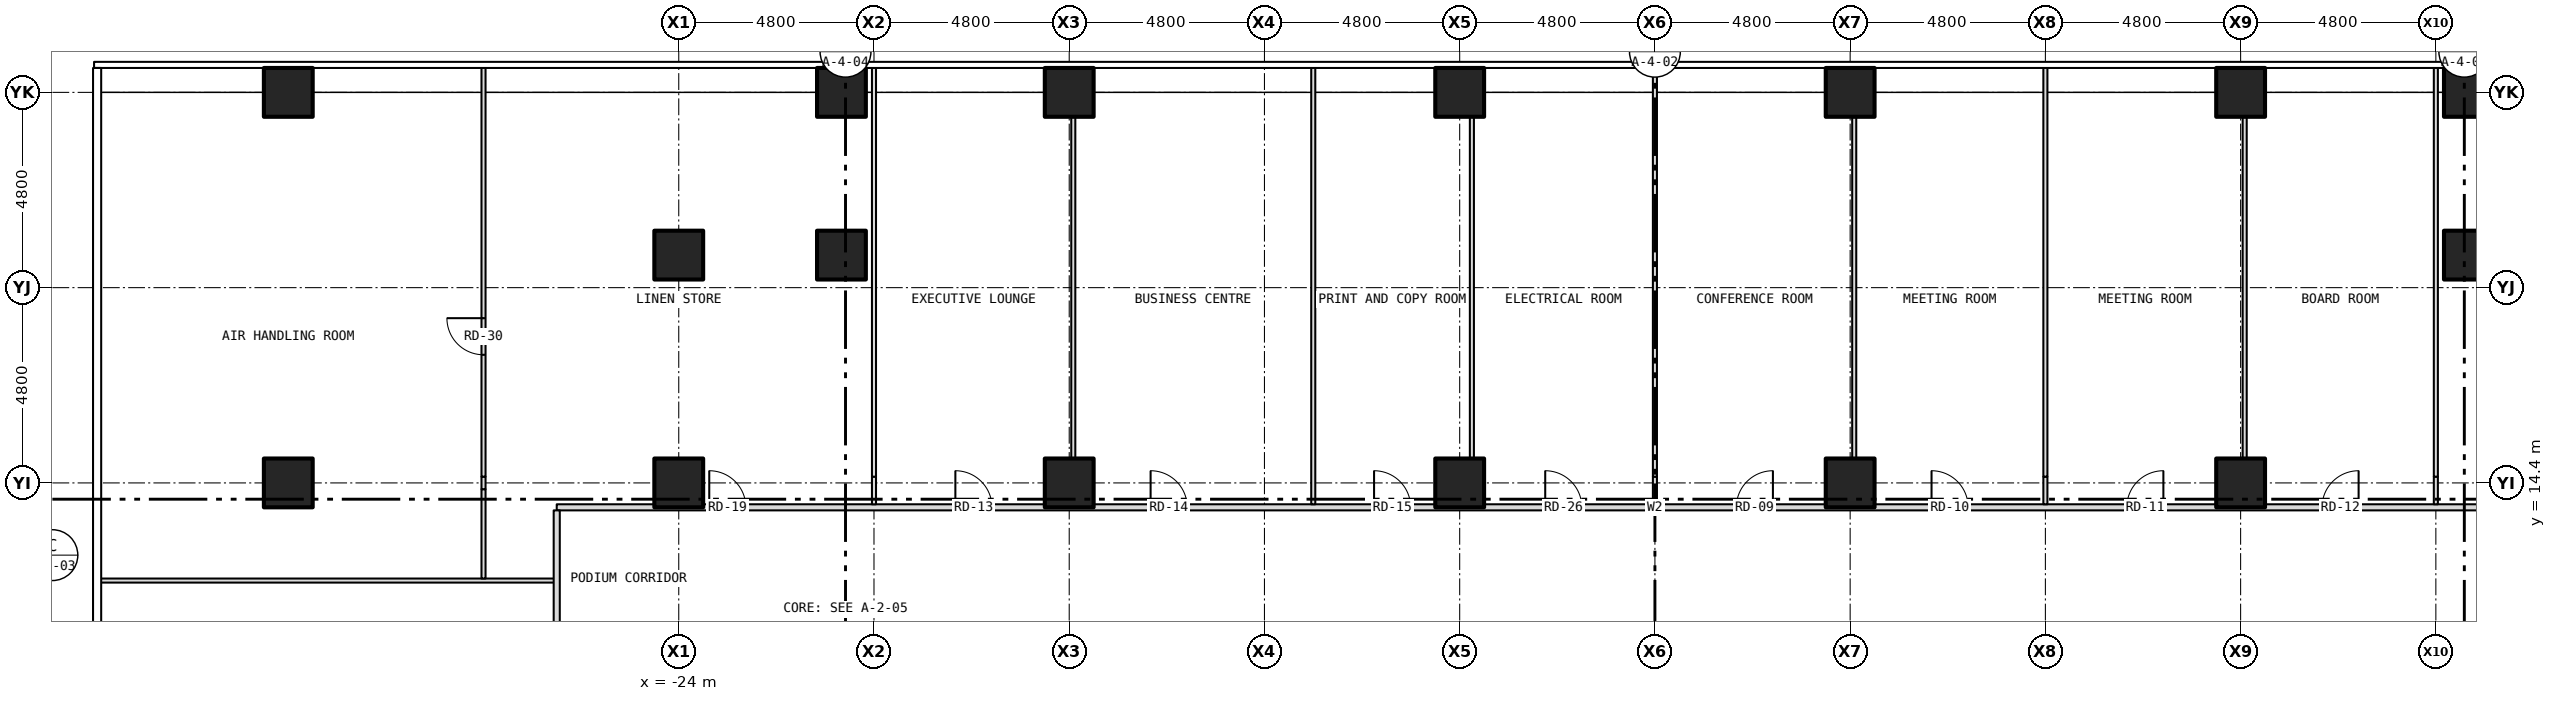
"""IFC4 building model, lengths in metres.
Left out: names, types, materials, properties, quantities, classifications, styles, units other than length and angle.
Written with IfcOpenShell. Run it as: python <this file> out.ifc"""

import sys

from ifc_helpers import new_model, si_unit, direction, frame, frame_2d, origin, origin_2d, place, context, subcontext, project, spatial, rectangle, hollow_rectangle, extrude, element, fill, save


model = new_model("IFC4")
c1 = context("Model", 3, precision=1e-05, world=origin(), true_north=direction((0.0, 1.0)))
c2 = subcontext(c1, "Body", "Model", "MODEL_VIEW")
j1 = project(units=[si_unit("LENGTHUNIT", "METRE"), si_unit("PLANEANGLEUNIT", "RADIAN")], contexts=[c1])
p1 = place(None, origin())
s1 = spatial("IfcSite", under=j1, at=p1, CompositionType="ELEMENT")
p2 = place(p1, origin())
s2 = spatial("IfcBuilding", under=s1, at=p2, CompositionType="ELEMENT")
p3 = place(p2, frame((0.0, 0.0, 15.5)))
s3 = spatial("IfcBuildingStorey", under=s2, at=p3, CompositionType="ELEMENT", Elevation=15.5)
for number, where, z_axis, x_axis in (
    (1, (-33.6, 14.4, -0.2), (0.0, 0.0, 1.0), (1.0, 0.0, 0.0)),
    (2, (-33.6, 24.0, -0.2), (0.0, 0.0, 1.0), (1.0, 0.0, 0.0)),
    (3, (-20.0, 24.0, -0.2), (0.0, 0.0, 1.0), (1.0, 0.0, 0.0)),
    (4, (-14.4, 24.0, -0.2), (0.0, 0.0, 1.0), (1.0, 0.0, 0.0)),
    (5, (-4.8, 24.0, -0.2), (0.0, 0.0, 1.0), (1.0, 0.0, 0.0)),
    (6, (4.8, 24.0, -0.2), (0.0, 0.0, 1.0), (1.0, 0.0, 0.0)),
    (7, (14.4, 24.0, -0.2), (0.0, 0.0, 1.0), (1.0, 0.0, 0.0)),
    (8, (20.0, 24.0, -0.2), (0.0, 0.0, 1.0), (1.0, 0.0, 0.0)),
    (9, (-24.0, 14.4, -0.2), (0.0, 0.0, 1.0), (1.0, 0.0, 0.0)),
    (10, (-24.0, 20.0, -0.2), (0.0, 0.0, 1.0), (1.0, 0.0, 0.0)),
    (11, (-20.0, 20.0, -0.2), (0.0, 0.0, 1.0), (1.0, 0.0, 0.0)),
    (12, (-14.4, 14.4, -0.2), (0.0, 0.0, 1.0), (1.0, 0.0, 0.0)),
    (13, (-4.8, 14.4, -0.2), (0.0, 0.0, 1.0), (1.0, 0.0, 0.0)),
    (14, (4.8, 14.4, -0.2), (0.0, 0.0, 1.0), (1.0, 0.0, 0.0)),
    (15, (14.4, 14.4, -0.2), (0.0, 0.0, 1.0), (1.0, 0.0, 0.0)),
    (16, (20.0, 20.0, -0.2), (0.0, 0.0, 1.0), (1.0, 0.0, 0.0)),
):
    element("IfcColumn", number, at=place(p3, frame(where, z_axis=z_axis, x_axis=x_axis)), inside=s3, PredefinedType="COLUMN", context=c2, shape_type="SweptSolid", body=[
        extrude(hollow_rectangle(XDim=1.2, YDim=1.2, WallThickness=0.07, at=origin_2d()), origin(), (0.0, 0.0, 1.0), 4.5),
    ])
p4 = place(p3, frame((-38.28, 12.0, 0.0), z_axis=(0.0, 0.0, 1.0), x_axis=(1.0, 0.0, 0.0)))
e17 = element("IfcWall", 17, at=p4, inside=s3, PredefinedType="PARTITIONING", context=c2, shape_type="SweptSolid", body=[
    extrude(rectangle(XDim=11.28, YDim=0.1, at=frame_2d((5.64, 0.0))), origin(), (0.0, 0.0, 1.0), 4.3),
])
p5 = place(p3, frame((-27.0, 13.8, 0.0), z_axis=(0.0, 0.0, 1.0), x_axis=(1.0, 0.0, 0.0)))
e18 = element("IfcWall", 18, at=p5, inside=s3, PredefinedType="PARTITIONING", context=c2, shape_type="SweptSolid", body=[
    extrude(rectangle(XDim=54.0, YDim=0.15, at=frame_2d((27.0, 0.0))), origin(), (0.0, 0.0, 1.0), 4.3),
])
p6 = place(p5, frame((29.001, 0.0, 0.0)))
e19 = element("IfcOpeningElement", 19, at=p6, cuts=e18, PredefinedType="OPENING", context=c2, shape_type="SweptSolid", body=[
    extrude(rectangle(XDim=0.9, YDim=2.1, at=frame_2d((0.45, 1.05))), frame((0.0, 0.087, 0.0), z_axis=(0.0, -1.0, 0.0), x_axis=(1.0, 0.0, 0.0)), (0.0, 0.0, 1.0), 0.174),
])
p7 = place(p5, frame((33.801, 0.0, 0.0)))
e20 = element("IfcOpeningElement", 20, at=p7, cuts=e18, PredefinedType="OPENING", context=c2, shape_type="SweptSolid", body=[
    extrude(rectangle(XDim=0.9, YDim=2.1, at=frame_2d((0.45, 1.05))), frame((0.0, 0.087, 0.0), z_axis=(0.0, -1.0, 0.0), x_axis=(1.0, 0.0, 0.0)), (0.0, 0.0, 1.0), 0.174),
])
p8 = place(p5, frame((38.601, 0.0, 0.0)))
e21 = element("IfcOpeningElement", 21, at=p8, cuts=e18, PredefinedType="OPENING", context=c2, shape_type="SweptSolid", body=[
    extrude(rectangle(XDim=0.9, YDim=2.1, at=frame_2d((0.45, 1.05))), frame((0.0, 0.087, 0.0), z_axis=(0.0, -1.0, 0.0), x_axis=(1.0, 0.0, 0.0)), (0.0, 0.0, 1.0), 0.174),
])
p9 = place(p5, frame((43.401, 0.0, 0.0)))
e22 = element("IfcOpeningElement", 22, at=p9, cuts=e18, PredefinedType="OPENING", context=c2, shape_type="SweptSolid", body=[
    extrude(rectangle(XDim=0.9, YDim=2.1, at=frame_2d((0.45, 1.05))), frame((0.0, 0.087, 0.0), z_axis=(0.0, -1.0, 0.0), x_axis=(1.0, 0.0, 0.0)), (0.0, 0.0, 1.0), 0.174),
])
p10 = place(p5, frame((9.801, 0.0, 0.0)))
e23 = element("IfcOpeningElement", 23, at=p10, cuts=e18, PredefinedType="OPENING", context=c2, shape_type="SweptSolid", body=[
    extrude(rectangle(XDim=0.9, YDim=2.1, at=frame_2d((0.45, 1.05))), frame((0.0, 0.087, 0.0), z_axis=(0.0, -1.0, 0.0), x_axis=(1.0, 0.0, 0.0)), (0.0, 0.0, 1.0), 0.174),
])
p11 = place(p5, frame((14.601, 0.0, 0.0)))
e24 = element("IfcOpeningElement", 24, at=p11, cuts=e18, PredefinedType="OPENING", context=c2, shape_type="SweptSolid", body=[
    extrude(rectangle(XDim=0.9, YDim=2.1, at=frame_2d((0.45, 1.05))), frame((0.0, 0.087, 0.0), z_axis=(0.0, -1.0, 0.0), x_axis=(1.0, 0.0, 0.0)), (0.0, 0.0, 1.0), 0.174),
])
p12 = place(p5, frame((20.095, 0.0, 0.0)))
e25 = element("IfcOpeningElement", 25, at=p12, cuts=e18, PredefinedType="OPENING", context=c2, shape_type="SweptSolid", body=[
    extrude(rectangle(XDim=0.9, YDim=2.1, at=frame_2d((0.45, 1.05))), frame((0.0, 0.087, 0.0), z_axis=(0.0, -1.0, 0.0), x_axis=(1.0, 0.0, 0.0)), (0.0, 0.0, 1.0), 0.174),
])
p13 = place(p5, frame((3.75, 0.0, 0.0)))
e26 = element("IfcOpeningElement", 26, at=p13, cuts=e18, PredefinedType="OPENING", context=c2, shape_type="SweptSolid", body=[
    extrude(rectangle(XDim=0.9, YDim=2.1, at=frame_2d((0.45, 1.05))), frame((0.0, 0.087, 0.0), z_axis=(0.0, -1.0, 0.0), x_axis=(1.0, 0.0, 0.0)), (0.0, 0.0, 1.0), 0.174),
])
p14 = place(p5, frame((49.35, 0.0, 0.0)))
e27 = element("IfcOpeningElement", 27, at=p14, cuts=e18, PredefinedType="OPENING", context=c2, shape_type="SweptSolid", body=[
    extrude(rectangle(XDim=0.9, YDim=2.1, at=frame_2d((0.45, 1.05))), frame((0.0, 0.087, 0.0), z_axis=(0.0, -1.0, 0.0), x_axis=(1.0, 0.0, 0.0)), (0.0, 0.0, 1.0), 0.174),
])
p15 = place(p5, frame((24.303, 0.0, 0.0)))
e28 = element("IfcOpeningElement", 28, at=p15, cuts=e18, PredefinedType="OPENING", context=c2, shape_type="SweptSolid", body=[
    extrude(rectangle(XDim=0.9, YDim=2.1, at=frame_2d((0.45, 1.05))), frame((0.0, 0.087, 0.0), z_axis=(0.0, -1.0, 0.0), x_axis=(1.0, 0.0, 0.0)), (0.0, 0.0, 1.0), 0.174),
])
p16 = place(p3, frame((-28.8, 12.05, 0.0), z_axis=(0.0, 0.0, 1.0), x_axis=(0.0, 1.0, 0.0)))
e29 = element("IfcWall", 29, at=p16, inside=s3, PredefinedType="PARTITIONING", context=c2, shape_type="SweptSolid", body=[
    extrude(rectangle(XDim=2.196, YDim=0.1, at=frame_2d((1.098, 0.0))), origin(), (0.0, 0.0, 1.0), 3.683),
])
p17 = place(p3, frame((-28.8, 14.246, 0.0), z_axis=(0.0, 0.0, 1.0), x_axis=(0.0, 1.0, 0.0)))
e30 = element("IfcWall", 30, at=p17, inside=s3, PredefinedType="PARTITIONING", context=c2, shape_type="SweptSolid", body=[
    extrude(rectangle(XDim=0.308, YDim=0.1, at=frame_2d((0.154, 0.0))), origin(), (0.0, 0.0, 1.0), 4.3),
])
p18 = place(p3, frame((-28.8, 14.554, 0.0), z_axis=(0.0, 0.0, 1.0), x_axis=(0.0, 1.0, 0.0)))
e31 = element("IfcWall", 31, at=p18, inside=s3, PredefinedType="PARTITIONING", context=c2, shape_type="SweptSolid", body=[
    extrude(rectangle(XDim=10.076, YDim=0.1, at=frame_2d((5.038, 0.0))), origin(), (0.0, 0.0, 1.0), 3.683),
])
p19 = place(p18, frame((2.996, 0.0, 0.0)))
e32 = element("IfcOpeningElement", 32, at=p19, cuts=e31, PredefinedType="OPENING", context=c2, shape_type="SweptSolid", body=[
    extrude(rectangle(XDim=0.9, YDim=2.1, at=frame_2d((0.45, 1.05))), frame((0.0, 0.062, 0.0), z_axis=(0.0, -1.0, 0.0), x_axis=(1.0, 0.0, 0.0)), (0.0, 0.0, 1.0), 0.124),
])
p20 = place(p3, frame((-27.0, -13.725, 0.0), z_axis=(0.0, 0.0, 1.0), x_axis=(0.0, 1.0, 0.0)))
e33 = element("IfcWall", 33, at=p20, inside=s3, PredefinedType="PARTITIONING", context=c2, shape_type="SweptSolid", body=[
    extrude(rectangle(XDim=27.45, YDim=0.15, at=frame_2d((13.725, 0.0))), origin(), (0.0, 0.0, 1.0), 4.3),
])
p21 = place(p20, frame((7.275, 0.0, 0.0)))
e34 = element("IfcOpeningElement", 34, at=p21, cuts=e33, PredefinedType="OPENING", context=c2, shape_type="SweptSolid", body=[
    extrude(rectangle(XDim=0.9, YDim=2.1, at=frame_2d((0.45, 1.05))), frame((0.0, 0.087, 0.0), z_axis=(0.0, -1.0, 0.0), x_axis=(1.0, 0.0, 0.0)), (0.0, 0.0, 1.0), 0.174),
])
p22 = place(p20, frame((19.275, 0.0, 0.0)))
e35 = element("IfcOpeningElement", 35, at=p22, cuts=e33, PredefinedType="OPENING", context=c2, shape_type="SweptSolid", body=[
    extrude(rectangle(XDim=0.9, YDim=2.1, at=frame_2d((0.45, 1.05))), frame((0.0, 0.087, 0.0), z_axis=(0.0, -1.0, 0.0), x_axis=(1.0, 0.0, 0.0)), (0.0, 0.0, 1.0), 0.174),
])
p23 = place(p3, frame((-19.2, 13.875, 0.0), z_axis=(0.0, 0.0, 1.0), x_axis=(0.0, 1.0, 0.0)))
e36 = element("IfcWall", 36, at=p23, inside=s3, PredefinedType="PARTITIONING", context=c2, shape_type="SweptSolid", body=[
    extrude(rectangle(XDim=0.679, YDim=0.1, at=frame_2d((0.339, 0.0))), origin(), (0.0, 0.0, 1.0), 4.3),
])
p24 = place(p3, frame((-19.2, 14.554, 0.0), z_axis=(0.0, 0.0, 1.0), x_axis=(0.0, 1.0, 0.0)))
e37 = element("IfcWall", 37, at=p24, inside=s3, PredefinedType="PARTITIONING", context=c2, shape_type="SweptSolid", body=[
    extrude(rectangle(XDim=10.076, YDim=0.1, at=frame_2d((5.038, 0.0))), origin(), (0.0, 0.0, 1.0), 3.683),
])
p25 = place(p3, frame((-14.3, 13.875, 0.0), z_axis=(0.0, 0.0, 1.0), x_axis=(0.0, 1.0, 0.0)))
e38 = element("IfcWall", 38, at=p25, inside=s3, PredefinedType="PARTITIONING", context=c2, shape_type="SweptSolid", body=[
    extrude(rectangle(XDim=1.125, YDim=0.1, at=frame_2d((0.562, 0.0))), origin(), (0.0, 0.0, 1.0), 4.3),
])
p26 = place(p3, frame((-14.3, 15.0, 0.0), z_axis=(0.0, 0.0, 1.0), x_axis=(0.0, 1.0, 0.0)))
e39 = element("IfcWall", 39, at=p26, inside=s3, PredefinedType="PARTITIONING", context=c2, shape_type="SweptSolid", body=[
    extrude(rectangle(XDim=8.4, YDim=0.1, at=frame_2d((4.2, 0.0))), origin(), (0.0, 0.0, 1.0), 3.373),
])
p27 = place(p3, frame((-14.3, 23.4, 0.0), z_axis=(0.0, 0.0, 1.0), x_axis=(0.0, 1.0, 0.0)))
e40 = element("IfcWall", 40, at=p27, inside=s3, PredefinedType="PARTITIONING", context=c2, shape_type="SweptSolid", body=[
    extrude(rectangle(XDim=0.48, YDim=0.1, at=frame_2d((0.24, 0.0))), origin(), (0.0, 0.0, 1.0), 4.3),
])
p28 = place(p3, frame((-8.4, 13.875, 0.0), z_axis=(0.0, 0.0, 1.0), x_axis=(0.0, 1.0, 0.0)))
e41 = element("IfcWall", 41, at=p28, inside=s3, PredefinedType="PARTITIONING", context=c2, shape_type="SweptSolid", body=[
    extrude(rectangle(XDim=10.755, YDim=0.1, at=frame_2d((5.377, 0.0))), origin(), (0.0, 0.0, 1.0), 4.3),
])
p29 = place(p3, frame((-4.5, 13.875, 0.0), z_axis=(0.0, 0.0, 1.0), x_axis=(0.0, 1.0, 0.0)))
e42 = element("IfcWall", 42, at=p29, inside=s3, PredefinedType="PARTITIONING", context=c2, shape_type="SweptSolid", body=[
    extrude(rectangle(XDim=10.005, YDim=0.1, at=frame_2d((5.002, 0.0))), origin(), (0.0, 0.0, 1.0), 4.3),
])
p30 = place(p3, frame((0.0, 13.875, 0.0), z_axis=(0.0, 0.0, 1.0), x_axis=(0.0, 1.0, 0.0)))
e43 = element("IfcWall", 43, at=p30, inside=s3, PredefinedType="PARTITIONING", context=c2, shape_type="SweptSolid", body=[
    extrude(rectangle(XDim=0.679, YDim=0.1, at=frame_2d((0.339, 0.0))), origin(), (0.0, 0.0, 1.0), 4.3),
])
p31 = place(p3, frame((0.0, 14.554, 0.0), z_axis=(0.0, 0.0, 1.0), x_axis=(0.0, 1.0, 0.0)))
e44 = element("IfcWall", 44, at=p31, inside=s3, PredefinedType="PARTITIONING", context=c2, shape_type="SweptSolid", body=[
    extrude(rectangle(XDim=10.076, YDim=0.1, at=frame_2d((5.038, 0.0))), origin(), (0.0, 0.0, 1.0), 3.683),
])
p32 = place(p3, frame((4.9, 13.875, 0.0), z_axis=(0.0, 0.0, 1.0), x_axis=(0.0, 1.0, 0.0)))
e45 = element("IfcWall", 45, at=p32, inside=s3, PredefinedType="PARTITIONING", context=c2, shape_type="SweptSolid", body=[
    extrude(rectangle(XDim=1.125, YDim=0.1, at=frame_2d((0.562, 0.0))), origin(), (0.0, 0.0, 1.0), 4.3),
])
p33 = place(p3, frame((4.9, 15.0, 0.0), z_axis=(0.0, 0.0, 1.0), x_axis=(0.0, 1.0, 0.0)))
e46 = element("IfcWall", 46, at=p33, inside=s3, PredefinedType="PARTITIONING", context=c2, shape_type="SweptSolid", body=[
    extrude(rectangle(XDim=8.4, YDim=0.1, at=frame_2d((4.2, 0.0))), origin(), (0.0, 0.0, 1.0), 3.373),
])
p34 = place(p3, frame((4.9, 23.4, 0.0), z_axis=(0.0, 0.0, 1.0), x_axis=(0.0, 1.0, 0.0)))
e47 = element("IfcWall", 47, at=p34, inside=s3, PredefinedType="PARTITIONING", context=c2, shape_type="SweptSolid", body=[
    extrude(rectangle(XDim=0.48, YDim=0.1, at=frame_2d((0.24, 0.0))), origin(), (0.0, 0.0, 1.0), 4.3),
])
p35 = place(p3, frame((9.6, 13.875, 0.0), z_axis=(0.0, 0.0, 1.0), x_axis=(0.0, 1.0, 0.0)))
e48 = element("IfcWall", 48, at=p35, inside=s3, PredefinedType="PARTITIONING", context=c2, shape_type="SweptSolid", body=[
    extrude(rectangle(XDim=0.679, YDim=0.1, at=frame_2d((0.339, 0.0))), origin(), (0.0, 0.0, 1.0), 4.3),
])
p36 = place(p3, frame((9.6, 14.554, 0.0), z_axis=(0.0, 0.0, 1.0), x_axis=(0.0, 1.0, 0.0)))
e49 = element("IfcWall", 49, at=p36, inside=s3, PredefinedType="PARTITIONING", context=c2, shape_type="SweptSolid", body=[
    extrude(rectangle(XDim=10.076, YDim=0.1, at=frame_2d((5.038, 0.0))), origin(), (0.0, 0.0, 1.0), 3.683),
])
p37 = place(p3, frame((14.5, 13.875, 0.0), z_axis=(0.0, 0.0, 1.0), x_axis=(0.0, 1.0, 0.0)))
e50 = element("IfcWall", 50, at=p37, inside=s3, PredefinedType="PARTITIONING", context=c2, shape_type="SweptSolid", body=[
    extrude(rectangle(XDim=1.125, YDim=0.1, at=frame_2d((0.562, 0.0))), origin(), (0.0, 0.0, 1.0), 4.3),
])
p38 = place(p3, frame((14.5, 15.0, 0.0), z_axis=(0.0, 0.0, 1.0), x_axis=(0.0, 1.0, 0.0)))
e51 = element("IfcWall", 51, at=p38, inside=s3, PredefinedType="PARTITIONING", context=c2, shape_type="SweptSolid", body=[
    extrude(rectangle(XDim=8.4, YDim=0.1, at=frame_2d((4.2, 0.0))), origin(), (0.0, 0.0, 1.0), 3.373),
])
p39 = place(p3, frame((14.5, 23.4, 0.0), z_axis=(0.0, 0.0, 1.0), x_axis=(0.0, 1.0, 0.0)))
e52 = element("IfcWall", 52, at=p39, inside=s3, PredefinedType="PARTITIONING", context=c2, shape_type="SweptSolid", body=[
    extrude(rectangle(XDim=0.48, YDim=0.1, at=frame_2d((0.24, 0.0))), origin(), (0.0, 0.0, 1.0), 4.3),
])
p40 = place(p3, frame((19.2, 13.875, 0.0), z_axis=(0.0, 0.0, 1.0), x_axis=(0.0, 1.0, 0.0)))
e53 = element("IfcWall", 53, at=p40, inside=s3, PredefinedType="PARTITIONING", context=c2, shape_type="SweptSolid", body=[
    extrude(rectangle(XDim=0.679, YDim=0.1, at=frame_2d((0.339, 0.0))), origin(), (0.0, 0.0, 1.0), 4.3),
])
p41 = place(p3, frame((19.2, 14.554, 0.0), z_axis=(0.0, 0.0, 1.0), x_axis=(0.0, 1.0, 0.0)))
e54 = element("IfcWall", 54, at=p41, inside=s3, PredefinedType="PARTITIONING", context=c2, shape_type="SweptSolid", body=[
    extrude(rectangle(XDim=10.076, YDim=0.1, at=frame_2d((5.038, 0.0))), origin(), (0.0, 0.0, 1.0), 3.683),
])
p42 = place(p6, origin())
e55 = element("IfcDoor", 55, at=p42, inside=s3, OperationType="SINGLE_SWING_RIGHT", PredefinedType="DOOR", context=c2, shape_type="SweptSolid", body=[
    extrude(rectangle(XDim=0.9, YDim=2.1, at=frame_2d((0.45, 1.05))), frame((0.0, 0.025, 0.0), z_axis=(0.0, -1.0, 0.0), x_axis=(1.0, 0.0, 0.0)), (0.0, 0.0, 1.0), 0.05),
])
fill(e19, e55)
p43 = place(p7, origin())
e56 = element("IfcDoor", 56, at=p43, inside=s3, OperationType="SINGLE_SWING_LEFT", PredefinedType="DOOR", context=c2, shape_type="SweptSolid", body=[
    extrude(rectangle(XDim=0.9, YDim=2.1, at=frame_2d((0.45, 1.05))), frame((0.0, 0.025, 0.0), z_axis=(0.0, -1.0, 0.0), x_axis=(1.0, 0.0, 0.0)), (0.0, 0.0, 1.0), 0.05),
])
fill(e20, e56)
p44 = place(p8, origin())
e57 = element("IfcDoor", 57, at=p44, inside=s3, OperationType="SINGLE_SWING_RIGHT", PredefinedType="DOOR", context=c2, shape_type="SweptSolid", body=[
    extrude(rectangle(XDim=0.9, YDim=2.1, at=frame_2d((0.45, 1.05))), frame((0.0, 0.025, 0.0), z_axis=(0.0, -1.0, 0.0), x_axis=(1.0, 0.0, 0.0)), (0.0, 0.0, 1.0), 0.05),
])
fill(e21, e57)
p45 = place(p9, origin())
e58 = element("IfcDoor", 58, at=p45, inside=s3, OperationType="SINGLE_SWING_RIGHT", PredefinedType="DOOR", context=c2, shape_type="SweptSolid", body=[
    extrude(rectangle(XDim=0.9, YDim=2.1, at=frame_2d((0.45, 1.05))), frame((0.0, 0.025, 0.0), z_axis=(0.0, -1.0, 0.0), x_axis=(1.0, 0.0, 0.0)), (0.0, 0.0, 1.0), 0.05),
])
fill(e22, e58)
p46 = place(p10, origin())
e59 = element("IfcDoor", 59, at=p46, inside=s3, OperationType="SINGLE_SWING_LEFT", PredefinedType="DOOR", context=c2, shape_type="SweptSolid", body=[
    extrude(rectangle(XDim=0.9, YDim=2.1, at=frame_2d((0.45, 1.05))), frame((0.0, 0.025, 0.0), z_axis=(0.0, -1.0, 0.0), x_axis=(1.0, 0.0, 0.0)), (0.0, 0.0, 1.0), 0.05),
])
fill(e23, e59)
p47 = place(p11, origin())
e60 = element("IfcDoor", 60, at=p47, inside=s3, OperationType="SINGLE_SWING_LEFT", PredefinedType="DOOR", context=c2, shape_type="SweptSolid", body=[
    extrude(rectangle(XDim=0.9, YDim=2.1, at=frame_2d((0.45, 1.05))), frame((0.0, 0.025, 0.0), z_axis=(0.0, -1.0, 0.0), x_axis=(1.0, 0.0, 0.0)), (0.0, 0.0, 1.0), 0.05),
])
fill(e24, e60)
p48 = place(p12, origin())
e61 = element("IfcDoor", 61, at=p48, inside=s3, OperationType="SINGLE_SWING_LEFT", PredefinedType="DOOR", context=c2, shape_type="SweptSolid", body=[
    extrude(rectangle(XDim=0.9, YDim=2.1, at=frame_2d((0.45, 1.05))), frame((0.0, 0.025, 0.0), z_axis=(0.0, -1.0, 0.0), x_axis=(1.0, 0.0, 0.0)), (0.0, 0.0, 1.0), 0.05),
])
fill(e25, e61)
p49 = place(p13, origin())
e62 = element("IfcDoor", 62, at=p49, inside=s3, OperationType="SINGLE_SWING_LEFT", PredefinedType="DOOR", context=c2, shape_type="SweptSolid", body=[
    extrude(rectangle(XDim=0.9, YDim=2.1, at=frame_2d((0.45, 1.05))), frame((0.0, 0.025, 0.0), z_axis=(0.0, -1.0, 0.0), x_axis=(1.0, 0.0, 0.0)), (0.0, 0.0, 1.0), 0.05),
])
fill(e26, e62)
p50 = place(p15, origin())
e63 = element("IfcDoor", 63, at=p50, inside=s3, OperationType="SINGLE_SWING_LEFT", PredefinedType="DOOR", context=c2, shape_type="SweptSolid", body=[
    extrude(rectangle(XDim=0.9, YDim=2.1, at=frame_2d((0.45, 1.05))), frame((0.0, 0.025, 0.0), z_axis=(0.0, -1.0, 0.0), x_axis=(1.0, 0.0, 0.0)), (0.0, 0.0, 1.0), 0.05),
])
fill(e28, e63)
p51 = place(p19, origin())
e64 = element("IfcDoor", 64, at=p51, inside=s3, OperationType="SINGLE_SWING_RIGHT", PredefinedType="DOOR", context=c2, shape_type="SweptSolid", body=[
    extrude(rectangle(XDim=0.9, YDim=2.1, at=frame_2d((0.45, 1.05))), frame((0.0, 0.025, 0.0), z_axis=(0.0, -1.0, 0.0), x_axis=(1.0, 0.0, 0.0)), (0.0, 0.0, 1.0), 0.05),
])
fill(e32, e64)
save(model, sys.argv[1])
